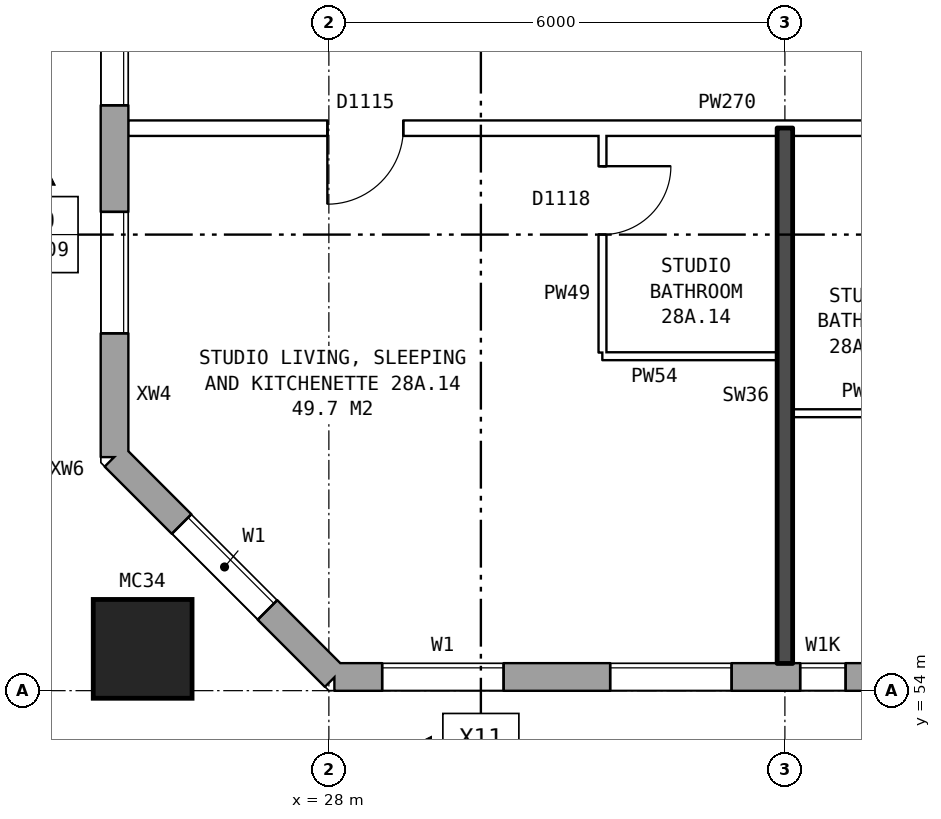
"""IFC4 building model, lengths in metres.
Left out: names, types, materials, properties, quantities, classifications, styles, units other than length and angle.
Written with IfcOpenShell. Run it as: python <this file> out.ifc"""

import sys

from ifc_helpers import new_model, si_unit, direction, frame, frame_2d, origin, origin_2d, place, context, subcontext, project, spatial, rectangle, hollow_rectangle, extrude, element, fill, save


model = new_model("IFC4")
c1 = context("Model", 3, precision=1e-05, world=origin(), true_north=direction((0.0, 1.0)))
c2 = subcontext(c1, "Body", "Model", "MODEL_VIEW")
j1 = project(units=[si_unit("LENGTHUNIT", "METRE"), si_unit("PLANEANGLEUNIT", "RADIAN")], contexts=[c1])
p1 = place(None, origin())
s1 = spatial("IfcSite", under=j1, at=p1, CompositionType="ELEMENT")
p2 = place(p1, origin())
s2 = spatial("IfcBuilding", under=s1, at=p2, CompositionType="ELEMENT")
p3 = place(p2, frame((0.0, 0.0, 102.6)))
s3 = spatial("IfcBuildingStorey", under=s2, at=p3, CompositionType="ELEMENT", Elevation=102.6)
p4 = place(p3, frame((25.55, 54.55, 0.0), z_axis=(0.0, 0.0, 1.0), x_axis=(1.0, 0.0, 0.0)))
e1 = element("IfcColumn", 1, at=p4, inside=s3, PredefinedType="COLUMN", context=c2, shape_type="SweptSolid", body=[
    extrude(hollow_rectangle(XDim=1.3, YDim=1.3, WallThickness=0.07, at=origin_2d()), origin(), (0.0, 0.0, 1.0), 3.1),
])
p5 = place(p3, frame((25.18, 57.075, 0.0), z_axis=(0.0, 0.0, 1.0), x_axis=(0.707106781187, -0.707106781187, 0.0)))
e2 = element("IfcWall", 2, at=p5, inside=s3, PredefinedType="STANDARD", context=c2, shape_type="SweptSolid", body=[
    extrude(rectangle(XDim=4.094, YDim=0.36, at=frame_2d((2.047, 0.0))), origin(), (0.0, 0.0, 1.0), 2.85),
])
p6 = place(p5, frame((1.247, 0.0, 0.8)))
e3 = element("IfcOpeningElement", 3, at=p6, cuts=e2, PredefinedType="OPENING", context=c2, shape_type="SweptSolid", body=[
    extrude(rectangle(XDim=1.6, YDim=1.8, at=frame_2d((0.8, 0.9))), frame((0.0, 0.19, 0.0), z_axis=(0.0, -1.0, 0.0), x_axis=(1.0, 0.0, 0.0)), (0.0, 0.0, 1.0), 0.38),
])
p7 = place(p3, frame((28.075, 54.18, 0.0), z_axis=(0.0, 0.0, 1.0), x_axis=(1.0, 0.0, 0.0)))
e4 = element("IfcWall", 4, at=p7, inside=s3, PredefinedType="STANDARD", context=c2, shape_type="SweptSolid", body=[
    extrude(rectangle(XDim=44.851, YDim=0.36, at=frame_2d((22.425, 0.0))), origin(), (0.0, 0.0, 1.0), 2.85),
])
p8 = place(p7, frame((0.625, 0.0, 0.8)))
e5 = element("IfcOpeningElement", 5, at=p8, cuts=e4, PredefinedType="OPENING", context=c2, shape_type="SweptSolid", body=[
    extrude(rectangle(XDim=1.6, YDim=1.8, at=frame_2d((0.8, 0.9))), frame((0.0, 0.19, 0.0), z_axis=(0.0, -1.0, 0.0), x_axis=(1.0, 0.0, 0.0)), (0.0, 0.0, 1.0), 0.38),
])
p9 = place(p7, frame((3.625, 0.0, 0.8)))
e6 = element("IfcOpeningElement", 6, at=p9, cuts=e4, PredefinedType="OPENING", context=c2, shape_type="SweptSolid", body=[
    extrude(rectangle(XDim=1.6, YDim=1.8, at=frame_2d((0.8, 0.9))), frame((0.0, 0.19, 0.0), z_axis=(0.0, -1.0, 0.0), x_axis=(1.0, 0.0, 0.0)), (0.0, 0.0, 1.0), 0.38),
])
p10 = place(p7, frame((6.125, 0.0, 1.0)))
e7 = element("IfcOpeningElement", 7, at=p10, cuts=e4, PredefinedType="OPENING", context=c2, shape_type="SweptSolid", body=[
    extrude(rectangle(XDim=0.6, YDim=1.5, at=frame_2d((0.3, 0.75))), frame((0.0, 0.19, 0.0), z_axis=(0.0, -1.0, 0.0), x_axis=(1.0, 0.0, 0.0)), (0.0, 0.0, 1.0), 0.38),
])
p11 = place(p7, frame((7.025, 0.0, 1.7)))
e8 = element("IfcOpeningElement", 8, at=p11, cuts=e4, PredefinedType="OPENING", context=c2, shape_type="SweptSolid", body=[
    extrude(rectangle(XDim=0.6, YDim=0.9, at=frame_2d((0.3, 0.45))), frame((0.0, 0.19, 0.0), z_axis=(0.0, -1.0, 0.0), x_axis=(1.0, 0.0, 0.0)), (0.0, 0.0, 1.0), 0.38),
])
p12 = place(p7, frame((12.625, 0.0, 0.8)))
e9 = element("IfcOpeningElement", 9, at=p12, cuts=e4, PredefinedType="OPENING", context=c2, shape_type="SweptSolid", body=[
    extrude(rectangle(XDim=1.6, YDim=1.8, at=frame_2d((0.8, 0.9))), frame((0.0, 0.19, 0.0), z_axis=(0.0, -1.0, 0.0), x_axis=(1.0, 0.0, 0.0)), (0.0, 0.0, 1.0), 0.38),
])
p13 = place(p7, frame((15.625, 0.0, 0.8)))
e10 = element("IfcOpeningElement", 10, at=p13, cuts=e4, PredefinedType="OPENING", context=c2, shape_type="SweptSolid", body=[
    extrude(rectangle(XDim=1.6, YDim=1.8, at=frame_2d((0.8, 0.9))), frame((0.0, 0.19, 0.0), z_axis=(0.0, -1.0, 0.0), x_axis=(1.0, 0.0, 0.0)), (0.0, 0.0, 1.0), 0.38),
])
p14 = place(p7, frame((18.625, 0.0, 0.8)))
e11 = element("IfcOpeningElement", 11, at=p14, cuts=e4, PredefinedType="OPENING", context=c2, shape_type="SweptSolid", body=[
    extrude(rectangle(XDim=1.6, YDim=1.8, at=frame_2d((0.8, 0.9))), frame((0.0, 0.19, 0.0), z_axis=(0.0, -1.0, 0.0), x_axis=(1.0, 0.0, 0.0)), (0.0, 0.0, 1.0), 0.38),
])
p15 = place(p7, frame((21.625, 0.0, 0.8)))
e12 = element("IfcOpeningElement", 12, at=p15, cuts=e4, PredefinedType="OPENING", context=c2, shape_type="SweptSolid", body=[
    extrude(rectangle(XDim=1.6, YDim=1.8, at=frame_2d((0.8, 0.9))), frame((0.0, 0.19, 0.0), z_axis=(0.0, -1.0, 0.0), x_axis=(1.0, 0.0, 0.0)), (0.0, 0.0, 1.0), 0.38),
])
p16 = place(p7, frame((24.625, 0.0, 0.8)))
e13 = element("IfcOpeningElement", 13, at=p16, cuts=e4, PredefinedType="OPENING", context=c2, shape_type="SweptSolid", body=[
    extrude(rectangle(XDim=1.6, YDim=1.8, at=frame_2d((0.8, 0.9))), frame((0.0, 0.19, 0.0), z_axis=(0.0, -1.0, 0.0), x_axis=(1.0, 0.0, 0.0)), (0.0, 0.0, 1.0), 0.38),
])
p17 = place(p7, frame((27.625, 0.0, 0.8)))
e14 = element("IfcOpeningElement", 14, at=p17, cuts=e4, PredefinedType="OPENING", context=c2, shape_type="SweptSolid", body=[
    extrude(rectangle(XDim=1.6, YDim=1.8, at=frame_2d((0.8, 0.9))), frame((0.0, 0.19, 0.0), z_axis=(0.0, -1.0, 0.0), x_axis=(1.0, 0.0, 0.0)), (0.0, 0.0, 1.0), 0.38),
])
p18 = place(p7, frame((30.625, 0.0, 0.8)))
e15 = element("IfcOpeningElement", 15, at=p18, cuts=e4, PredefinedType="OPENING", context=c2, shape_type="SweptSolid", body=[
    extrude(rectangle(XDim=1.6, YDim=1.8, at=frame_2d((0.8, 0.9))), frame((0.0, 0.19, 0.0), z_axis=(0.0, -1.0, 0.0), x_axis=(1.0, 0.0, 0.0)), (0.0, 0.0, 1.0), 0.38),
])
p19 = place(p7, frame((33.075, 0.0, 0.8)))
e16 = element("IfcOpeningElement", 16, at=p19, cuts=e4, PredefinedType="OPENING", context=c2, shape_type="SweptSolid", body=[
    extrude(rectangle(XDim=1.6, YDim=1.8, at=frame_2d((0.8, 0.9))), frame((0.0, 0.19, 0.0), z_axis=(0.0, -1.0, 0.0), x_axis=(1.0, 0.0, 0.0)), (0.0, 0.0, 1.0), 0.38),
])
p20 = place(p7, frame((37.175, 0.0, 1.7)))
e17 = element("IfcOpeningElement", 17, at=p20, cuts=e4, PredefinedType="OPENING", context=c2, shape_type="SweptSolid", body=[
    extrude(rectangle(XDim=1.0, YDim=0.9, at=frame_2d((0.5, 0.45))), frame((0.0, 0.19, 0.0), z_axis=(0.0, -1.0, 0.0), x_axis=(1.0, 0.0, 0.0)), (0.0, 0.0, 1.0), 0.38),
])
p21 = place(p7, frame((39.625, 0.0, 0.8)))
e18 = element("IfcOpeningElement", 18, at=p21, cuts=e4, PredefinedType="OPENING", context=c2, shape_type="SweptSolid", body=[
    extrude(rectangle(XDim=1.6, YDim=1.8, at=frame_2d((0.8, 0.9))), frame((0.0, 0.19, 0.0), z_axis=(0.0, -1.0, 0.0), x_axis=(1.0, 0.0, 0.0)), (0.0, 0.0, 1.0), 0.38),
])
p22 = place(p7, frame((42.625, 0.0, 0.8)))
e19 = element("IfcOpeningElement", 19, at=p22, cuts=e4, PredefinedType="OPENING", context=c2, shape_type="SweptSolid", body=[
    extrude(rectangle(XDim=1.6, YDim=1.8, at=frame_2d((0.8, 0.9))), frame((0.0, 0.19, 0.0), z_axis=(0.0, -1.0, 0.0), x_axis=(1.0, 0.0, 0.0)), (0.0, 0.0, 1.0), 0.38),
])
p23 = place(p7, frame((8.925, 0.0, 0.8)))
e20 = element("IfcOpeningElement", 20, at=p23, cuts=e4, PredefinedType="OPENING", context=c2, shape_type="SweptSolid", body=[
    extrude(rectangle(XDim=1.0, YDim=0.9, at=frame_2d((0.5, 0.45))), frame((0.0, 0.19, 0.0), z_axis=(0.0, -1.0, 0.0), x_axis=(1.0, 0.0, 0.0)), (0.0, 0.0, 1.0), 0.38),
])
p24 = place(p7, frame((10.225, 0.0, 0.8)))
e21 = element("IfcOpeningElement", 21, at=p24, cuts=e4, PredefinedType="OPENING", context=c2, shape_type="SweptSolid", body=[
    extrude(rectangle(XDim=1.4, YDim=1.8, at=frame_2d((0.7, 0.9))), frame((0.0, 0.19, 0.0), z_axis=(0.0, -1.0, 0.0), x_axis=(1.0, 0.0, 0.0)), (0.0, 0.0, 1.0), 0.38),
])
p25 = place(p7, frame((34.975, 0.0, 0.8)))
e22 = element("IfcOpeningElement", 22, at=p25, cuts=e4, PredefinedType="OPENING", context=c2, shape_type="SweptSolid", body=[
    extrude(rectangle(XDim=0.6, YDim=0.9, at=frame_2d((0.3, 0.45))), frame((0.0, 0.19, 0.0), z_axis=(0.0, -1.0, 0.0), x_axis=(1.0, 0.0, 0.0)), (0.0, 0.0, 1.0), 0.38),
])
p26 = place(p7, frame((38.475, 0.0, 0.8)))
e23 = element("IfcOpeningElement", 23, at=p26, cuts=e4, PredefinedType="OPENING", context=c2, shape_type="SweptSolid", body=[
    extrude(rectangle(XDim=0.8, YDim=1.8, at=frame_2d((0.4, 0.9))), frame((0.0, 0.19, 0.0), z_axis=(0.0, -1.0, 0.0), x_axis=(1.0, 0.0, 0.0)), (0.0, 0.0, 1.0), 0.38),
])
p27 = place(p3, frame((25.18, 82.925, 0.0), z_axis=(0.0, 0.0, 1.0), x_axis=(0.0, -1.0, 0.0)))
e24 = element("IfcWall", 24, at=p27, inside=s3, PredefinedType="STANDARD", context=c2, shape_type="SweptSolid", body=[
    extrude(rectangle(XDim=25.851, YDim=0.36, at=frame_2d((12.925, 0.0))), origin(), (0.0, 0.0, 1.0), 2.85),
])
p28 = place(p27, frame((1.625, 0.0, 0.8)))
e25 = element("IfcOpeningElement", 25, at=p28, cuts=e24, PredefinedType="OPENING", context=c2, shape_type="SweptSolid", body=[
    extrude(rectangle(XDim=1.6, YDim=1.8, at=frame_2d((0.8, 0.9))), frame((0.0, 0.19, 0.0), z_axis=(0.0, -1.0, 0.0), x_axis=(1.0, 0.0, 0.0)), (0.0, 0.0, 1.0), 0.38),
])
p29 = place(p27, frame((4.625, 0.0, 0.8)))
e26 = element("IfcOpeningElement", 26, at=p29, cuts=e24, PredefinedType="OPENING", context=c2, shape_type="SweptSolid", body=[
    extrude(rectangle(XDim=1.6, YDim=1.8, at=frame_2d((0.8, 0.9))), frame((0.0, 0.19, 0.0), z_axis=(0.0, -1.0, 0.0), x_axis=(1.0, 0.0, 0.0)), (0.0, 0.0, 1.0), 0.38),
])
p30 = place(p27, frame((7.625, 0.0, 0.8)))
e27 = element("IfcOpeningElement", 27, at=p30, cuts=e24, PredefinedType="OPENING", context=c2, shape_type="SweptSolid", body=[
    extrude(rectangle(XDim=1.6, YDim=1.8, at=frame_2d((0.8, 0.9))), frame((0.0, 0.19, 0.0), z_axis=(0.0, -1.0, 0.0), x_axis=(1.0, 0.0, 0.0)), (0.0, 0.0, 1.0), 0.38),
])
p31 = place(p27, frame((6.525, 0.0, 0.8)))
e28 = element("IfcOpeningElement", 28, at=p31, cuts=e24, PredefinedType="OPENING", context=c2, shape_type="SweptSolid", body=[
    extrude(rectangle(XDim=0.8, YDim=1.8, at=frame_2d((0.4, 0.9))), frame((0.0, 0.19, 0.0), z_axis=(0.0, -1.0, 0.0), x_axis=(1.0, 0.0, 0.0)), (0.0, 0.0, 1.0), 0.38),
])
p32 = place(p27, frame((9.525, 0.0, 1.7)))
e29 = element("IfcOpeningElement", 29, at=p32, cuts=e24, PredefinedType="OPENING", context=c2, shape_type="SweptSolid", body=[
    extrude(rectangle(XDim=0.8, YDim=0.9, at=frame_2d((0.4, 0.45))), frame((0.0, 0.19, 0.0), z_axis=(0.0, -1.0, 0.0), x_axis=(1.0, 0.0, 0.0)), (0.0, 0.0, 1.0), 0.38),
])
p33 = place(p27, frame((16.625, 0.0, 0.8)))
e30 = element("IfcOpeningElement", 30, at=p33, cuts=e24, PredefinedType="OPENING", context=c2, shape_type="SweptSolid", body=[
    extrude(rectangle(XDim=1.6, YDim=1.8, at=frame_2d((0.8, 0.9))), frame((0.0, 0.19, 0.0), z_axis=(0.0, -1.0, 0.0), x_axis=(1.0, 0.0, 0.0)), (0.0, 0.0, 1.0), 0.38),
])
p34 = place(p27, frame((19.625, 0.0, 0.8)))
e31 = element("IfcOpeningElement", 31, at=p34, cuts=e24, PredefinedType="OPENING", context=c2, shape_type="SweptSolid", body=[
    extrude(rectangle(XDim=1.6, YDim=1.8, at=frame_2d((0.8, 0.9))), frame((0.0, 0.19, 0.0), z_axis=(0.0, -1.0, 0.0), x_axis=(1.0, 0.0, 0.0)), (0.0, 0.0, 1.0), 0.38),
])
p35 = place(p27, frame((22.625, 0.0, 0.8)))
e32 = element("IfcOpeningElement", 32, at=p35, cuts=e24, PredefinedType="OPENING", context=c2, shape_type="SweptSolid", body=[
    extrude(rectangle(XDim=1.6, YDim=1.8, at=frame_2d((0.8, 0.9))), frame((0.0, 0.19, 0.0), z_axis=(0.0, -1.0, 0.0), x_axis=(1.0, 0.0, 0.0)), (0.0, 0.0, 1.0), 0.38),
])
p36 = place(p27, frame((11.425, 0.0, 0.8)))
e33 = element("IfcOpeningElement", 33, at=p36, cuts=e24, PredefinedType="OPENING", context=c2, shape_type="SweptSolid", body=[
    extrude(rectangle(XDim=0.6, YDim=0.9, at=frame_2d((0.3, 0.45))), frame((0.0, 0.19, 0.0), z_axis=(0.0, -1.0, 0.0), x_axis=(1.0, 0.0, 0.0)), (0.0, 0.0, 1.0), 0.38),
])
p37 = place(p27, frame((12.325, 0.0, 0.8)))
e34 = element("IfcOpeningElement", 34, at=p37, cuts=e24, PredefinedType="OPENING", context=c2, shape_type="SweptSolid", body=[
    extrude(rectangle(XDim=1.2, YDim=1.8, at=frame_2d((0.6, 0.9))), frame((0.0, 0.19, 0.0), z_axis=(0.0, -1.0, 0.0), x_axis=(1.0, 0.0, 0.0)), (0.0, 0.0, 1.0), 0.38),
])
p38 = place(p27, frame((13.825, 0.0, 0.8)))
e35 = element("IfcOpeningElement", 35, at=p38, cuts=e24, PredefinedType="OPENING", context=c2, shape_type="SweptSolid", body=[
    extrude(rectangle(XDim=0.6, YDim=0.9, at=frame_2d((0.3, 0.45))), frame((0.0, 0.19, 0.0), z_axis=(0.0, -1.0, 0.0), x_axis=(1.0, 0.0, 0.0)), (0.0, 0.0, 1.0), 0.38),
])
p39 = place(p27, frame((15.525, 0.0, 1.7)))
e36 = element("IfcOpeningElement", 36, at=p39, cuts=e24, PredefinedType="OPENING", context=c2, shape_type="SweptSolid", body=[
    extrude(rectangle(XDim=0.6, YDim=0.9, at=frame_2d((0.3, 0.45))), frame((0.0, 0.19, 0.0), z_axis=(0.0, -1.0, 0.0), x_axis=(1.0, 0.0, 0.0)), (0.0, 0.0, 1.0), 0.38),
])
p40 = place(p27, frame((18.525, 0.0, 0.8)))
e37 = element("IfcOpeningElement", 37, at=p40, cuts=e24, PredefinedType="OPENING", context=c2, shape_type="SweptSolid", body=[
    extrude(rectangle(XDim=0.8, YDim=1.8, at=frame_2d((0.4, 0.9))), frame((0.0, 0.19, 0.0), z_axis=(0.0, -1.0, 0.0), x_axis=(1.0, 0.0, 0.0)), (0.0, 0.0, 1.0), 0.38),
])
p41 = place(p3, frame((34.1, 57.65, 0.0), z_axis=(0.0, 0.0, 1.0), x_axis=(1.0, 0.0, 0.0)))
e38 = element("IfcWall", 38, at=p41, inside=s3, PredefinedType="PARTITIONING", context=c2, shape_type="SweptSolid", body=[
    extrude(rectangle(XDim=1.9, YDim=0.1, at=frame_2d((0.95, 0.0))), origin(), (0.0, 0.0, 1.0), 2.85),
])
p42 = place(p3, frame((31.6, 58.4, 0.0), z_axis=(0.0, 0.0, 1.0), x_axis=(1.0, 0.0, 0.0)))
e39 = element("IfcWall", 39, at=p42, inside=s3, PredefinedType="PARTITIONING", context=c2, shape_type="SweptSolid", body=[
    extrude(rectangle(XDim=2.3, YDim=0.1, at=frame_2d((1.15, 0.0))), origin(), (0.0, 0.0, 1.0), 2.85),
])
p43 = place(p3, frame((25.36, 61.4, 0.0), z_axis=(0.0, 0.0, 1.0), x_axis=(1.0, 0.0, 0.0)))
e40 = element("IfcWall", 40, at=p43, inside=s3, PredefinedType="PARTITIONING", context=c2, shape_type="SweptSolid", body=[
    extrude(rectangle(XDim=20.54, YDim=0.2, at=frame_2d((10.27, 0.0))), origin(), (0.0, 0.0, 1.0), 2.85),
])
p44 = place(p43, frame((18.09, 0.0, 0.0)))
e41 = element("IfcOpeningElement", 41, at=p44, cuts=e40, PredefinedType="OPENING", context=c2, shape_type="SweptSolid", body=[
    extrude(rectangle(XDim=1.0, YDim=2.1, at=frame_2d((0.5, 1.05))), frame((0.0, 0.11, 0.0), z_axis=(0.0, -1.0, 0.0), x_axis=(1.0, 0.0, 0.0)), (0.0, 0.0, 1.0), 0.22),
])
p45 = place(p43, frame((12.14, 0.0, 0.0)))
e42 = element("IfcOpeningElement", 42, at=p45, cuts=e40, PredefinedType="OPENING", context=c2, shape_type="SweptSolid", body=[
    extrude(rectangle(XDim=1.0, YDim=2.1, at=frame_2d((0.5, 1.05))), frame((0.0, 0.11, 0.0), z_axis=(0.0, -1.0, 0.0), x_axis=(1.0, 0.0, 0.0)), (0.0, 0.0, 1.0), 0.22),
])
p46 = place(p43, frame((2.62, 0.0, 0.0)))
e43 = element("IfcOpeningElement", 43, at=p46, cuts=e40, PredefinedType="OPENING", context=c2, shape_type="SweptSolid", body=[
    extrude(rectangle(XDim=1.0, YDim=2.1, at=frame_2d((0.5, 1.05))), frame((0.0, 0.11, 0.0), z_axis=(0.0, -1.0, 0.0), x_axis=(1.0, 0.0, 0.0)), (0.0, 0.0, 1.0), 0.22),
])
p47 = place(p3, frame((31.6, 58.45, 0.0), z_axis=(0.0, 0.0, 1.0), x_axis=(0.0, 1.0, 0.0)))
e44 = element("IfcWall", 44, at=p47, inside=s3, PredefinedType="PARTITIONING", context=c2, shape_type="SweptSolid", body=[
    extrude(rectangle(XDim=2.85, YDim=0.1, at=frame_2d((1.425, 0.0))), origin(), (0.0, 0.0, 1.0), 2.85),
])
p48 = place(p47, frame((1.55, 0.0, 0.0)))
e45 = element("IfcOpeningElement", 45, at=p48, cuts=e44, PredefinedType="OPENING", context=c2, shape_type="SweptSolid", body=[
    extrude(rectangle(XDim=0.9, YDim=2.1, at=frame_2d((0.45, 1.05))), frame((0.0, 0.06, 0.0), z_axis=(0.0, -1.0, 0.0), x_axis=(1.0, 0.0, 0.0)), (0.0, 0.0, 1.0), 0.12),
])
p49 = place(p3, frame((34.0, 54.36, 0.0), z_axis=(0.0, 0.0, 1.0), x_axis=(0.0, 1.0, 0.0)))
e46 = element("IfcWall", 46, at=p49, inside=s3, PredefinedType="SOLIDWALL", context=c2, shape_type="SweptSolid", body=[
    extrude(rectangle(XDim=7.04, YDim=0.2, at=frame_2d((3.52, 0.0))), origin(), (0.0, 0.0, 1.0), 2.85),
])
p50 = place(p6, origin())
e47 = element("IfcWindow", 47, at=p50, inside=s3, PartitioningType="SINGLE_PANEL", PredefinedType="WINDOW", context=c2, shape_type="SweptSolid", body=[
    extrude(rectangle(XDim=1.6, YDim=1.8, at=frame_2d((0.8, 0.9))), frame((0.0, 0.15, 0.0), z_axis=(0.0, -1.0, 0.0), x_axis=(1.0, 0.0, 0.0)), (0.0, 0.0, 1.0), 0.06),
])
fill(e3, e47)
p51 = place(p8, origin())
e48 = element("IfcWindow", 48, at=p51, inside=s3, PartitioningType="SINGLE_PANEL", PredefinedType="WINDOW", context=c2, shape_type="SweptSolid", body=[
    extrude(rectangle(XDim=1.6, YDim=1.8, at=frame_2d((0.8, 0.9))), frame((0.0, 0.15, 0.0), z_axis=(0.0, -1.0, 0.0), x_axis=(1.0, 0.0, 0.0)), (0.0, 0.0, 1.0), 0.06),
])
fill(e5, e48)
p52 = place(p9, origin())
e49 = element("IfcWindow", 49, at=p52, inside=s3, PartitioningType="SINGLE_PANEL", PredefinedType="WINDOW", context=c2, shape_type="SweptSolid", body=[
    extrude(rectangle(XDim=1.6, YDim=1.8, at=frame_2d((0.8, 0.9))), frame((0.0, 0.15, 0.0), z_axis=(0.0, -1.0, 0.0), x_axis=(1.0, 0.0, 0.0)), (0.0, 0.0, 1.0), 0.06),
])
fill(e6, e49)
p53 = place(p10, origin())
e50 = element("IfcWindow", 50, at=p53, inside=s3, PartitioningType="SINGLE_PANEL", PredefinedType="WINDOW", context=c2, shape_type="SweptSolid", body=[
    extrude(rectangle(XDim=0.6, YDim=1.5, at=frame_2d((0.3, 0.75))), frame((0.0, 0.15, 0.0), z_axis=(0.0, -1.0, 0.0), x_axis=(1.0, 0.0, 0.0)), (0.0, 0.0, 1.0), 0.06),
])
fill(e7, e50)
p54 = place(p34, origin())
e51 = element("IfcWindow", 51, at=p54, inside=s3, PartitioningType="SINGLE_PANEL", PredefinedType="WINDOW", context=c2, shape_type="SweptSolid", body=[
    extrude(rectangle(XDim=1.6, YDim=1.8, at=frame_2d((0.8, 0.9))), frame((0.0, 0.15, 0.0), z_axis=(0.0, -1.0, 0.0), x_axis=(1.0, 0.0, 0.0)), (0.0, 0.0, 1.0), 0.06),
])
fill(e31, e51)
p55 = place(p35, origin())
e52 = element("IfcWindow", 52, at=p55, inside=s3, PartitioningType="SINGLE_PANEL", PredefinedType="WINDOW", context=c2, shape_type="SweptSolid", body=[
    extrude(rectangle(XDim=1.6, YDim=1.8, at=frame_2d((0.8, 0.9))), frame((0.0, 0.15, 0.0), z_axis=(0.0, -1.0, 0.0), x_axis=(1.0, 0.0, 0.0)), (0.0, 0.0, 1.0), 0.06),
])
fill(e32, e52)
p56 = place(p46, frame((1.0, 0.0, 0.0), z_axis=(0.0, 0.0, 1.0), x_axis=(-1.0, 0.0, 0.0)))
e53 = element("IfcDoor", 53, at=p56, inside=s3, OperationType="SINGLE_SWING_RIGHT", PredefinedType="DOOR", context=c2, shape_type="SweptSolid", body=[
    extrude(rectangle(XDim=1.0, YDim=2.1, at=frame_2d((0.5, 1.05))), frame((0.0, 0.025, 0.0), z_axis=(0.0, -1.0, 0.0), x_axis=(1.0, 0.0, 0.0)), (0.0, 0.0, 1.0), 0.05),
])
fill(e43, e53)
p57 = place(p48, frame((0.9, 0.0, 0.0), z_axis=(0.0, 0.0, 1.0), x_axis=(-1.0, 0.0, 0.0)))
e54 = element("IfcDoor", 54, at=p57, inside=s3, OperationType="SINGLE_SWING_LEFT", PredefinedType="DOOR", context=c2, shape_type="SweptSolid", body=[
    extrude(rectangle(XDim=0.9, YDim=2.1, at=frame_2d((0.45, 1.05))), frame((0.0, 0.025, 0.0), z_axis=(0.0, -1.0, 0.0), x_axis=(1.0, 0.0, 0.0)), (0.0, 0.0, 1.0), 0.05),
])
fill(e45, e54)
save(model, sys.argv[1])
